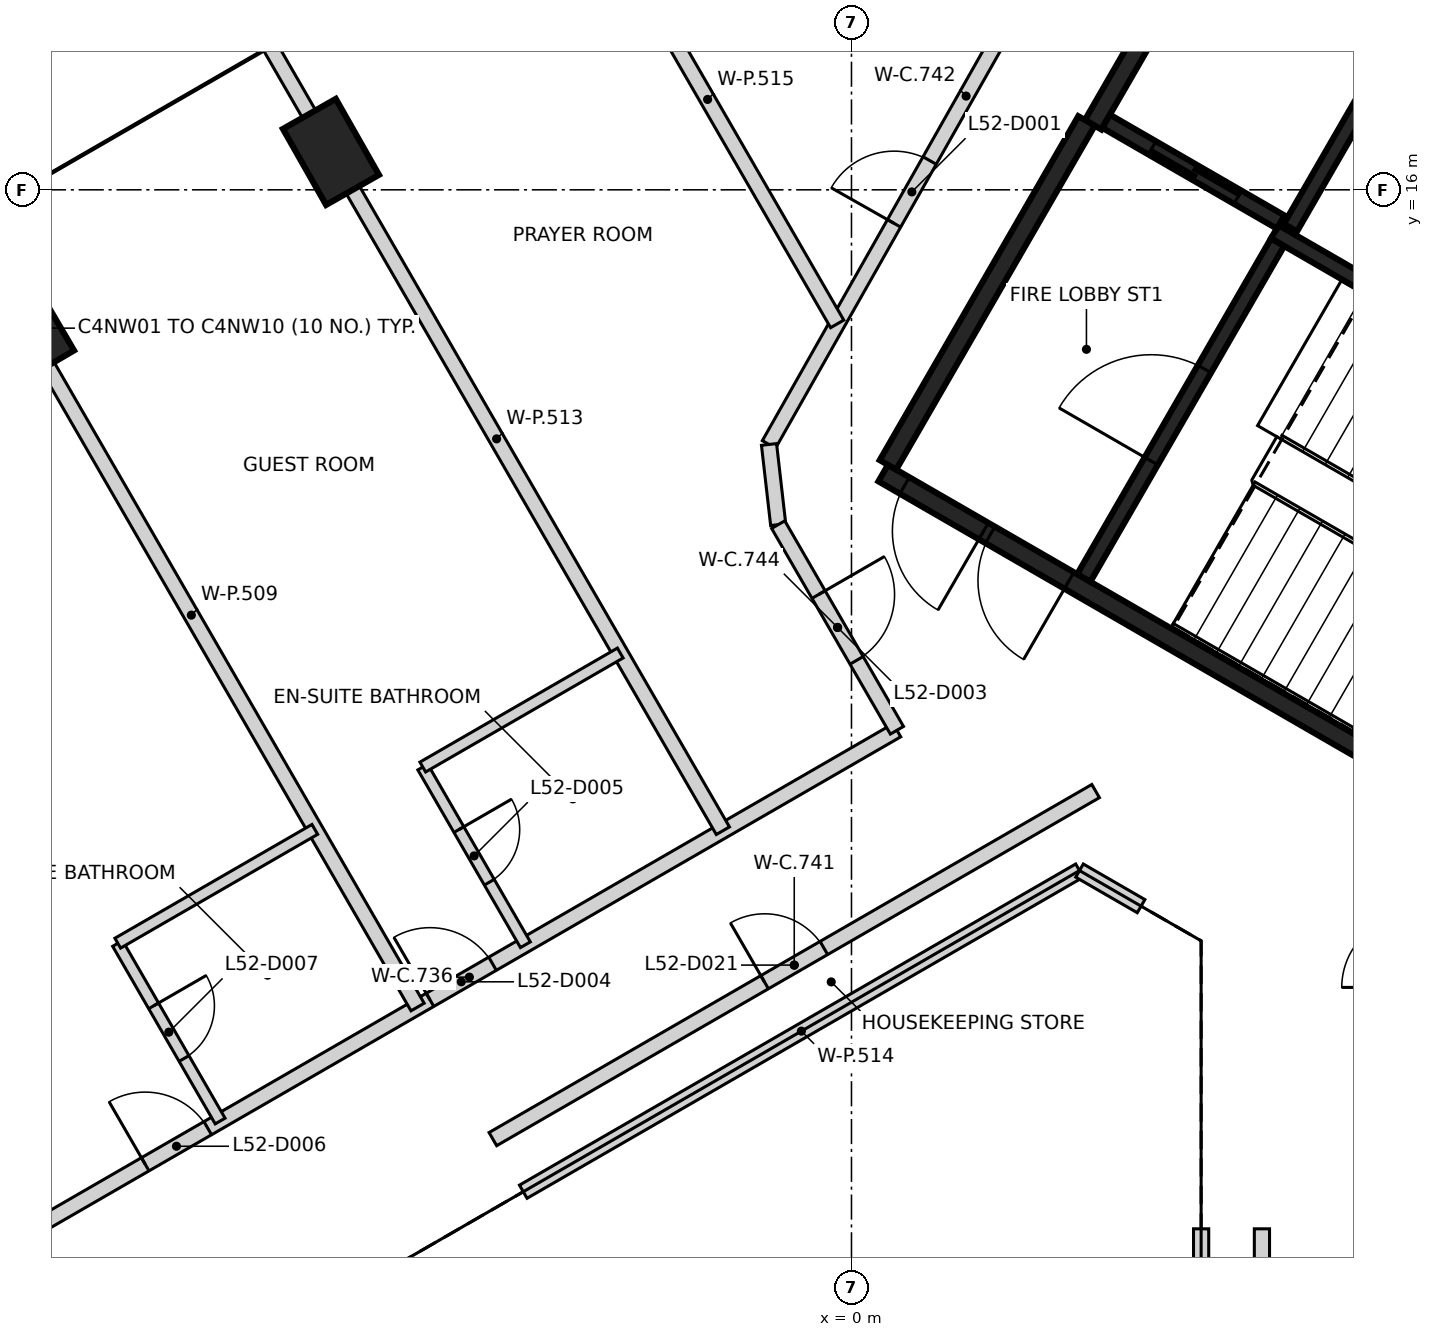
"""IFC4 building model, lengths in metres.
Left out: names, types, materials, properties, quantities, classifications, styles, units other than length and angle.
Written with IfcOpenShell. Run it as: python <this file> out.ifc"""

import sys

from ifc_helpers import new_model, si_unit, direction, frame, frame_2d, origin, origin_2d, place, context, subcontext, project, spatial, rectangle, extrude, element, fill, save


model = new_model("IFC4")
c1 = context("Model", 3, precision=1e-05, world=origin(), true_north=direction((0.0, 1.0)))
c2 = subcontext(c1, "Body", "Model", "MODEL_VIEW")
j1 = project(units=[si_unit("LENGTHUNIT", "METRE"), si_unit("PLANEANGLEUNIT", "RADIAN")], contexts=[c1])
p1 = place(None, origin())
s1 = spatial("IfcSite", under=j1, at=p1, CompositionType="ELEMENT")
p2 = place(p1, origin())
s2 = spatial("IfcBuilding", under=s1, at=p2, CompositionType="ELEMENT")
p3 = place(p2, frame((0.0, 0.0, 208.0)))
s3 = spatial("IfcBuildingStorey", under=s2, at=p3, CompositionType="ELEMENT", Elevation=208.0)
for number, where, z_axis, x_axis in (
    (1, (-6.848, 16.499, -0.35), (0.0, 0.0, 1.0), (-0.494, 0.87, 0.0)),
    (2, (-10.864, 14.18, -0.35), (0.0, 0.0, 1.0), (-0.506, 0.862, 0.0)),
):
    element("IfcColumn", number, at=place(p3, frame(where, z_axis=z_axis, x_axis=x_axis)), inside=s3, PredefinedType="COLUMN", context=c2, shape_type="SweptSolid", body=[
        extrude(rectangle(XDim=1.15, YDim=0.8, at=origin_2d()), origin(), (0.0, 0.0, 1.0), 2.736),
    ])
p4 = place(p3, frame((10.42, 6.498, 0.0), z_axis=(0.0, 0.0, 1.0), x_axis=(-0.866021906294, 0.500006057782, 0.0)))
e3 = element("IfcWall", 3, at=p4, inside=s3, PredefinedType="SHEAR", context=c2, shape_type="SweptSolid", body=[
    extrude(rectangle(XDim=11.55, YDim=0.25, at=frame_2d((5.775, 0.0))), origin(), (0.0, 0.0, 1.0), 3.2),
])
p5 = place(p4, frame((10.025, 0.0, 0.0)))
e4 = element("IfcOpeningElement", 4, at=p5, cuts=e3, PredefinedType="OPENING", context=c2, shape_type="SweptSolid", body=[
    extrude(rectangle(XDim=1.2, YDim=2.1, at=frame_2d((0.6, 1.05))), frame((0.0, 0.135, 0.0), z_axis=(0.0, -1.0, 0.0), x_axis=(1.0, 0.0, 0.0)), (0.0, 0.0, 1.0), 0.27),
])
p6 = place(p4, frame((8.725, 0.0, 0.0)))
e5 = element("IfcOpeningElement", 5, at=p6, cuts=e3, PredefinedType="OPENING", context=c2, shape_type="SweptSolid", body=[
    extrude(rectangle(XDim=1.2, YDim=2.1, at=frame_2d((0.6, 1.05))), frame((0.0, 0.135, 0.0), z_axis=(0.0, -1.0, 0.0), x_axis=(1.0, 0.0, 0.0)), (0.0, 0.0, 1.0), 0.27),
])
p7 = place(p3, frame((6.304, 22.269, 0.0), z_axis=(0.0, 0.0, 1.0), x_axis=(0.866022959057, -0.500004234368, 0.0)))
e6 = element("IfcWall", 6, at=p7, inside=s3, PredefinedType="SHEAR", context=c2, shape_type="SweptSolid", body=[
    extrude(rectangle(XDim=8.75, YDim=0.25, at=frame_2d((4.375, 0.0))), origin(), (0.0, 0.0, 1.0), 3.2),
])
p8 = place(p3, frame((3.179, 16.856, 0.0), z_axis=(0.0, 0.0, 1.0), x_axis=(0.500001955336, 0.866024274868, 0.0)))
e7 = element("IfcWall", 7, at=p8, inside=s3, PredefinedType="SHEAR", context=c2, shape_type="SweptSolid", body=[
    extrude(rectangle(XDim=6.125, YDim=0.25, at=frame_2d((3.062, 0.0))), origin(), (0.0, 0.0, 1.0), 3.2),
])
p9 = place(p8, frame((3.563, 0.0, 0.0)))
e8 = element("IfcOpeningElement", 8, at=p9, cuts=e7, PredefinedType="OPENING", context=c2, shape_type="SweptSolid", body=[
    extrude(rectangle(XDim=1.0, YDim=2.1, at=frame_2d((0.5, 1.05))), frame((0.0, 0.135, 0.0), z_axis=(0.0, -1.0, 0.0), x_axis=(1.0, 0.0, 0.0)), (0.0, 0.0, 1.0), 0.27),
])
p10 = place(p3, frame((0.48, 12.381, 0.0), z_axis=(0.0, 0.0, 1.0), x_axis=(0.49999885962, 0.866026062182, 0.0)))
e9 = element("IfcWall", 9, at=p10, inside=s3, PredefinedType="SHEAR", context=c2, shape_type="SweptSolid", body=[
    extrude(rectangle(XDim=5.225, YDim=0.25, at=frame_2d((2.612, 0.0))), origin(), (0.0, 0.0, 1.0), 3.2),
])
p11 = place(p3, frame((10.743, 12.46, 0.0), z_axis=(0.0, 0.0, 1.0), x_axis=(-0.866018848283, 0.500011354289, 0.0)))
e10 = element("IfcWall", 10, at=p11, inside=s3, PredefinedType="SHEAR", context=c2, shape_type="SweptSolid", body=[
    extrude(rectangle(XDim=5.974, YDim=0.2, at=frame_2d((2.987, 0.0))), origin(), (0.0, 0.0, 1.0), 3.2),
])
p12 = place(p3, frame((3.057, 10.895, 0.0), z_axis=(0.0, 0.0, 1.0), x_axis=(0.500027839223, 0.866009330205, 0.0)))
e11 = element("IfcWall", 11, at=p12, inside=s3, PredefinedType="SHEAR", context=c2, shape_type="SweptSolid", body=[
    extrude(rectangle(XDim=5.098, YDim=0.2, at=frame_2d((2.549, 0.0))), origin(), (0.0, 0.0, 1.0), 3.2),
])
p13 = place(p12, frame((1.774, 0.0, 0.0)))
e12 = element("IfcOpeningElement", 12, at=p13, cuts=e11, PredefinedType="OPENING", context=c2, shape_type="SweptSolid", body=[
    extrude(rectangle(XDim=1.4, YDim=2.1, at=frame_2d((0.7, 1.05))), frame((0.0, 0.11, 0.0), z_axis=(0.0, -1.0, 0.0), x_axis=(1.0, 0.0, 0.0)), (0.0, 0.0, 1.0), 0.22),
])
p14 = place(p3, frame((7.324, 18.187, 0.0), z_axis=(0.0, 0.0, 1.0), x_axis=(-0.499967891604, -0.866043940782, 0.0)))
e13 = element("IfcWall", 13, at=p14, inside=s3, PredefinedType="SHEAR", context=c2, shape_type="SweptSolid", body=[
    extrude(rectangle(XDim=3.1, YDim=0.2, at=frame_2d((1.55, 0.0))), origin(), (0.0, 0.0, 1.0), 3.2),
])
p15 = place(p3, frame((5.646, 15.576, 0.0), z_axis=(0.0, 0.0, 1.0), x_axis=(-0.866018407898, 0.500012117035, 0.0)))
e14 = element("IfcWall", 14, at=p15, inside=s3, PredefinedType="SHEAR", context=c2, shape_type="SweptSolid", body=[
    extrude(rectangle(XDim=2.651, YDim=0.2, at=frame_2d((1.325, 0.0))), origin(), (0.0, 0.0, 1.0), 3.2),
])
p16 = place(p15, frame((0.652, 0.0, 0.0)))
e15 = element("IfcOpeningElement", 15, at=p16, cuts=e14, PredefinedType="OPENING", context=c2, shape_type="SweptSolid", body=[
    extrude(rectangle(XDim=1.3, YDim=2.1, at=frame_2d((0.65, 1.05))), frame((0.0, 0.11, 0.0), z_axis=(0.0, -1.0, 0.0), x_axis=(1.0, 0.0, 0.0)), (0.0, 0.0, 1.0), 0.22),
])
p17 = place(p3, frame((-10.652, 2.394, 0.0), z_axis=(0.0, 0.0, 1.0), x_axis=(0.866016271077, 0.500015817979, 0.0)))
e16 = element("IfcWall", 16, at=p17, inside=s3, PredefinedType="PARTITIONING", context=c2, shape_type="SweptSolid", body=[
    extrude(rectangle(XDim=12.991, YDim=0.2, at=frame_2d((6.495, 0.0))), origin(), (0.0, 0.0, 1.0), 3.2),
])
p18 = place(p17, frame((5.898, 0.0, 0.0)))
e17 = element("IfcOpeningElement", 17, at=p18, cuts=e16, PredefinedType="OPENING", context=c2, shape_type="SweptSolid", body=[
    extrude(rectangle(XDim=0.95, YDim=2.1, at=frame_2d((0.475, 1.05))), frame((0.0, 0.11, 0.0), z_axis=(0.0, -1.0, 0.0), x_axis=(1.0, 0.0, 0.0)), (0.0, 0.0, 1.0), 0.22),
])
p19 = place(p17, frame((1.571, 0.0, 0.0)))
e18 = element("IfcOpeningElement", 18, at=p19, cuts=e16, PredefinedType="OPENING", context=c2, shape_type="SweptSolid", body=[
    extrude(rectangle(XDim=0.95, YDim=2.1, at=frame_2d((0.475, 1.05))), frame((0.0, 0.11, 0.0), z_axis=(0.0, -1.0, 0.0), x_axis=(1.0, 0.0, 0.0)), (0.0, 0.0, 1.0), 0.22),
])
p20 = place(p3, frame((-4.718, 3.511, 0.0), z_axis=(0.0, 0.0, 1.0), x_axis=(0.865989775611, 0.500061704731, 0.0)))
e19 = element("IfcWall", 19, at=p20, inside=s3, PredefinedType="PARTITIONING", context=c2, shape_type="SweptSolid", body=[
    extrude(rectangle(XDim=9.157, YDim=0.2, at=frame_2d((4.579, 0.0))), origin(), (0.0, 0.0, 1.0), 3.2),
])
p21 = place(p20, frame((4.128, 0.0, 0.0)))
e20 = element("IfcOpeningElement", 20, at=p21, cuts=e19, PredefinedType="OPENING", context=c2, shape_type="SweptSolid", body=[
    extrude(rectangle(XDim=0.9, YDim=2.1, at=frame_2d((0.45, 1.05))), frame((0.0, 0.11, 0.0), z_axis=(0.0, -1.0, 0.0), x_axis=(1.0, 0.0, 0.0)), (0.0, 0.0, 1.0), 0.22),
])
p22 = place(p3, frame((-1.086, 12.65, 0.0), z_axis=(0.0, 0.0, 1.0), x_axis=(0.492552173528, 0.87028291742, 0.0)))
e21 = element("IfcWall", 21, at=p22, inside=s3, PredefinedType="PARTITIONING", context=c2, shape_type="SweptSolid", body=[
    extrude(rectangle(XDim=10.531, YDim=0.2, at=frame_2d((5.266, 0.0))), origin(), (0.0, 0.0, 1.0), 3.2),
])
p23 = place(p22, frame((3.342, 0.0, 0.0)))
e22 = element("IfcOpeningElement", 22, at=p23, cuts=e21, PredefinedType="OPENING", context=c2, shape_type="SweptSolid", body=[
    extrude(rectangle(XDim=0.95, YDim=2.1, at=frame_2d((0.475, 1.05))), frame((0.0, 0.11, 0.0), z_axis=(0.0, -1.0, 0.0), x_axis=(1.0, 0.0, 0.0)), (0.0, 0.0, 1.0), 0.22),
])
p24 = place(p3, frame((-1.085, 12.65, 0.0), z_axis=(0.0, 0.0, 1.0), x_axis=(0.113812454263, -0.993502252264, 0.0)))
e23 = element("IfcWall", 23, at=p24, inside=s3, PredefinedType="PARTITIONING", context=c2, shape_type="SweptSolid", body=[
    extrude(rectangle(XDim=1.062, YDim=0.2, at=frame_2d((0.531, 0.0))), origin(), (0.0, 0.0, 1.0), 3.2),
])
p25 = place(p3, frame((-0.964, 11.595, 0.0), z_axis=(0.0, 0.0, 1.0), x_axis=(0.500056215256, -0.865992945458, 0.0)))
e24 = element("IfcWall", 24, at=p25, inside=s3, PredefinedType="PARTITIONING", context=c2, shape_type="SweptSolid", body=[
    extrude(rectangle(XDim=3.124, YDim=0.2, at=frame_2d((1.562, 0.0))), origin(), (0.0, 0.0, 1.0), 3.2),
])
p26 = place(p25, frame((1.062, 0.0, 0.0)))
e25 = element("IfcOpeningElement", 25, at=p26, cuts=e24, PredefinedType="OPENING", context=c2, shape_type="SweptSolid", body=[
    extrude(rectangle(XDim=1.0, YDim=2.1, at=frame_2d((0.5, 1.05))), frame((0.0, 0.11, 0.0), z_axis=(0.0, -1.0, 0.0), x_axis=(1.0, 0.0, 0.0)), (0.0, 0.0, 1.0), 0.22),
])
p27 = place(p3, frame((5.4, -6.827, 0.0), z_axis=(0.0, 0.0, 1.0), x_axis=(0.0, 1.0, 0.0)))
e26 = element("IfcWall", 26, at=p27, inside=s3, PredefinedType="PARTITIONING", context=c2, shape_type="SweptSolid", body=[
    extrude(rectangle(XDim=9.158, YDim=0.2, at=frame_2d((4.579, 0.0))), origin(), (0.0, 0.0, 1.0), 3.2),
])
p28 = place(p27, frame((4.129, 0.0, 0.0)))
e27 = element("IfcOpeningElement", 27, at=p28, cuts=e26, PredefinedType="OPENING", context=c2, shape_type="SweptSolid", body=[
    extrude(rectangle(XDim=0.9, YDim=2.1, at=frame_2d((0.45, 1.05))), frame((0.0, 0.11, 0.0), z_axis=(0.0, -1.0, 0.0), x_axis=(1.0, 0.0, 0.0)), (0.0, 0.0, 1.0), 0.22),
])
p29 = place(p3, frame((-11.661, 15.561, 0.0), z_axis=(0.0, 0.0, 1.0), x_axis=(0.499960887391, -0.866047984282, 0.0)))
e28 = element("IfcWall", 28, at=p29, inside=s3, PredefinedType="PARTITIONING", context=c2, shape_type="SweptSolid", body=[
    extrude(rectangle(XDim=11.907, YDim=0.2, at=frame_2d((5.953, 0.0))), origin(), (0.0, 0.0, 1.0), 3.2),
])
p30 = place(p3, frame((-7.646, 17.879, 0.0), z_axis=(0.0, 0.0, 1.0), x_axis=(0.500042538917, -0.866000842536, 0.0)))
e29 = element("IfcWall", 29, at=p30, inside=s3, PredefinedType="PARTITIONING", context=c2, shape_type="SweptSolid", body=[
    extrude(rectangle(XDim=11.906, YDim=0.2, at=frame_2d((5.953, 0.0))), origin(), (0.0, 0.0, 1.0), 3.2),
])
p31 = place(p3, frame((-4.318, 2.819, 0.0), z_axis=(0.0, 0.0, 1.0), x_axis=(0.866038843867, 0.499976720371, 0.0)))
e30 = element("IfcWall", 30, at=p31, inside=s3, PredefinedType="PARTITIONING", context=c2, shape_type="SweptSolid", body=[
    extrude(rectangle(XDim=8.45, YDim=0.2, at=frame_2d((4.225, 0.0))), origin(), (0.0, 0.0, 1.0), 3.2),
])
p32 = place(p3, frame((-3.598, 20.142, 0.0), z_axis=(0.0, 0.0, 1.0), x_axis=(0.499981732209, -0.866035950442, 0.0)))
e31 = element("IfcWall", 31, at=p32, inside=s3, PredefinedType="PARTITIONING", context=c2, shape_type="SweptSolid", body=[
    extrude(rectangle(XDim=6.82, YDim=0.2, at=frame_2d((3.41, 0.0))), origin(), (0.0, 0.0, 1.0), 3.2),
])
p33 = place(p3, frame((3.0, 7.044, 0.0), z_axis=(0.0, 0.0, 1.0), x_axis=(0.865872609263, -0.500264554538, 0.0)))
e32 = element("IfcWall", 32, at=p33, inside=s3, PredefinedType="PARTITIONING", context=c2, shape_type="SweptSolid", body=[
    extrude(rectangle(XDim=0.936, YDim=0.2, at=frame_2d((0.468, 0.0))), origin(), (0.0, 0.0, 1.0), 3.2),
])
p34 = place(p3, frame((4.6, -6.12, 0.0), z_axis=(0.0, 0.0, 1.0), x_axis=(0.0, 1.0, 0.0)))
e33 = element("IfcWall", 33, at=p34, inside=s3, PredefinedType="PARTITIONING", context=c2, shape_type="SweptSolid", body=[
    extrude(rectangle(XDim=8.451, YDim=0.2, at=frame_2d((4.226, 0.0))), origin(), (0.0, 0.0, 1.0), 3.2),
])
p35 = place(p3, frame((-9.655, 6.085, 0.0), z_axis=(0.0, 0.0, 1.0), x_axis=(0.500129820725, -0.865950438779, 0.0)))
e34 = element("IfcWall", 34, at=p35, inside=s3, PredefinedType="PARTITIONING", context=c2, shape_type="SweptSolid", body=[
    extrude(rectangle(XDim=2.698, YDim=0.15, at=frame_2d((1.349, 0.0))), origin(), (0.0, 0.0, 1.0), 3.2),
])
p36 = place(p35, frame((0.948, 0.0, 0.0)))
e35 = element("IfcOpeningElement", 35, at=p36, cuts=e34, PredefinedType="OPENING", context=c2, shape_type="SweptSolid", body=[
    extrude(rectangle(XDim=0.8, YDim=2.1, at=frame_2d((0.4, 1.05))), frame((0.0, 0.085, 0.0), z_axis=(0.0, -1.0, 0.0), x_axis=(1.0, 0.0, 0.0)), (0.0, 0.0, 1.0), 0.17),
])
p37 = place(p3, frame((-9.653, 6.089, 0.0), z_axis=(0.0, 0.0, 1.0), x_axis=(0.866021254674, 0.500007186402, 0.0)))
e36 = element("IfcWall", 36, at=p37, inside=s3, PredefinedType="PARTITIONING", context=c2, shape_type="SweptSolid", body=[
    extrude(rectangle(XDim=2.994, YDim=0.15, at=frame_2d((1.497, 0.0))), origin(), (0.0, 0.0, 1.0), 3.2),
])
p38 = place(p3, frame((-5.64, 8.406, 0.0), z_axis=(0.0, 0.0, 1.0), x_axis=(0.50001992892, -0.866013897511, 0.0)))
e37 = element("IfcWall", 37, at=p38, inside=s3, PredefinedType="PARTITIONING", context=c2, shape_type="SweptSolid", body=[
    extrude(rectangle(XDim=2.7, YDim=0.15, at=frame_2d((1.35, 0.0))), origin(), (0.0, 0.0, 1.0), 3.2),
])
p39 = place(p38, frame((0.95, 0.0, 0.0)))
e38 = element("IfcOpeningElement", 38, at=p39, cuts=e37, PredefinedType="OPENING", context=c2, shape_type="SweptSolid", body=[
    extrude(rectangle(XDim=0.8, YDim=2.1, at=frame_2d((0.4, 1.05))), frame((0.0, 0.085, 0.0), z_axis=(0.0, -1.0, 0.0), x_axis=(1.0, 0.0, 0.0)), (0.0, 0.0, 1.0), 0.17),
])
p40 = place(p3, frame((-5.64, 8.406, 0.0), z_axis=(0.0, 0.0, 1.0), x_axis=(0.866010750942, 0.50002537861, 0.0)))
e39 = element("IfcWall", 39, at=p40, inside=s3, PredefinedType="PARTITIONING", context=c2, shape_type="SweptSolid", body=[
    extrude(rectangle(XDim=3.0, YDim=0.15, at=frame_2d((1.5, 0.0))), origin(), (0.0, 0.0, 1.0), 3.2),
])
p41 = place(p16, origin())
e40 = element("IfcDoor", 40, at=p41, inside=s3, OperationType="SLIDING_TO_RIGHT", PredefinedType="DOOR", context=c2, shape_type="SweptSolid", body=[
    extrude(rectangle(XDim=1.3, YDim=2.1, at=frame_2d((0.65, 1.05))), frame((0.0, 0.025, 0.0), z_axis=(0.0, -1.0, 0.0), x_axis=(1.0, 0.0, 0.0)), (0.0, 0.0, 1.0), 0.05),
])
fill(e15, e40)
p42 = place(p5, origin())
e41 = element("IfcDoor", 41, at=p42, inside=s3, OperationType="SINGLE_SWING_LEFT", PredefinedType="DOOR", context=c2, shape_type="SweptSolid", body=[
    extrude(rectangle(XDim=1.2, YDim=2.1, at=frame_2d((0.6, 1.05))), frame((0.0, 0.025, 0.0), z_axis=(0.0, -1.0, 0.0), x_axis=(1.0, 0.0, 0.0)), (0.0, 0.0, 1.0), 0.05),
])
fill(e4, e41)
p43 = place(p6, origin())
e42 = element("IfcDoor", 42, at=p43, inside=s3, OperationType="SINGLE_SWING_RIGHT", PredefinedType="DOOR", context=c2, shape_type="SweptSolid", body=[
    extrude(rectangle(XDim=1.2, YDim=2.1, at=frame_2d((0.6, 1.05))), frame((0.0, 0.025, 0.0), z_axis=(0.0, -1.0, 0.0), x_axis=(1.0, 0.0, 0.0)), (0.0, 0.0, 1.0), 0.05),
])
fill(e5, e42)
p44 = place(p13, origin())
e43 = element("IfcDoor", 43, at=p44, inside=s3, OperationType="SINGLE_SWING_RIGHT", PredefinedType="DOOR", context=c2, shape_type="SweptSolid", body=[
    extrude(rectangle(XDim=1.4, YDim=2.1, at=frame_2d((0.7, 1.05))), frame((0.0, 0.025, 0.0), z_axis=(0.0, -1.0, 0.0), x_axis=(1.0, 0.0, 0.0)), (0.0, 0.0, 1.0), 0.05),
])
fill(e12, e43)
p45 = place(p23, origin())
e44 = element("IfcDoor", 44, at=p45, inside=s3, OperationType="SINGLE_SWING_LEFT", PredefinedType="DOOR", context=c2, shape_type="SweptSolid", body=[
    extrude(rectangle(XDim=0.95, YDim=2.1, at=frame_2d((0.475, 1.05))), frame((0.0, 0.025, 0.0), z_axis=(0.0, -1.0, 0.0), x_axis=(1.0, 0.0, 0.0)), (0.0, 0.0, 1.0), 0.05),
])
fill(e22, e44)
p46 = place(p26, frame((1.0, 0.0, 0.0), z_axis=(0.0, 0.0, 1.0), x_axis=(-1.0, 0.0, 0.0)))
e45 = element("IfcDoor", 45, at=p46, inside=s3, OperationType="SINGLE_SWING_LEFT", PredefinedType="DOOR", context=c2, shape_type="SweptSolid", body=[
    extrude(rectangle(XDim=1.0, YDim=2.1, at=frame_2d((0.5, 1.05))), frame((0.0, 0.025, 0.0), z_axis=(0.0, -1.0, 0.0), x_axis=(1.0, 0.0, 0.0)), (0.0, 0.0, 1.0), 0.05),
])
fill(e25, e45)
p47 = place(p18, origin())
e46 = element("IfcDoor", 46, at=p47, inside=s3, OperationType="SINGLE_SWING_LEFT", PredefinedType="DOOR", context=c2, shape_type="SweptSolid", body=[
    extrude(rectangle(XDim=0.95, YDim=2.1, at=frame_2d((0.475, 1.05))), frame((0.0, 0.025, 0.0), z_axis=(0.0, -1.0, 0.0), x_axis=(1.0, 0.0, 0.0)), (0.0, 0.0, 1.0), 0.05),
])
fill(e17, e46)
p48 = place(p39, origin())
e47 = element("IfcDoor", 47, at=p48, inside=s3, OperationType="SINGLE_SWING_LEFT", PredefinedType="DOOR", context=c2, shape_type="SweptSolid", body=[
    extrude(rectangle(XDim=0.8, YDim=2.1, at=frame_2d((0.4, 1.05))), frame((0.0, 0.025, 0.0), z_axis=(0.0, -1.0, 0.0), x_axis=(1.0, 0.0, 0.0)), (0.0, 0.0, 1.0), 0.05),
])
fill(e38, e47)
p49 = place(p19, origin())
e48 = element("IfcDoor", 48, at=p49, inside=s3, OperationType="SINGLE_SWING_LEFT", PredefinedType="DOOR", context=c2, shape_type="SweptSolid", body=[
    extrude(rectangle(XDim=0.95, YDim=2.1, at=frame_2d((0.475, 1.05))), frame((0.0, 0.025, 0.0), z_axis=(0.0, -1.0, 0.0), x_axis=(1.0, 0.0, 0.0)), (0.0, 0.0, 1.0), 0.05),
])
fill(e18, e48)
p50 = place(p36, frame((0.8, 0.0, 0.0), z_axis=(0.0, 0.0, 1.0), x_axis=(-1.0, 0.0, 0.0)))
e49 = element("IfcDoor", 49, at=p50, inside=s3, OperationType="SINGLE_SWING_LEFT", PredefinedType="DOOR", context=c2, shape_type="SweptSolid", body=[
    extrude(rectangle(XDim=0.8, YDim=2.1, at=frame_2d((0.4, 1.05))), frame((0.0, 0.025, 0.0), z_axis=(0.0, -1.0, 0.0), x_axis=(1.0, 0.0, 0.0)), (0.0, 0.0, 1.0), 0.05),
])
fill(e35, e49)
p51 = place(p21, frame((0.9, 0.0, 0.0), z_axis=(0.0, 0.0, 1.0), x_axis=(-1.0, 0.0, 0.0)))
e50 = element("IfcDoor", 50, at=p51, inside=s3, OperationType="SINGLE_SWING_LEFT", PredefinedType="DOOR", context=c2, shape_type="SweptSolid", body=[
    extrude(rectangle(XDim=0.9, YDim=2.1, at=frame_2d((0.45, 1.05))), frame((0.0, 0.025, 0.0), z_axis=(0.0, -1.0, 0.0), x_axis=(1.0, 0.0, 0.0)), (0.0, 0.0, 1.0), 0.05),
])
fill(e20, e50)
save(model, sys.argv[1])
